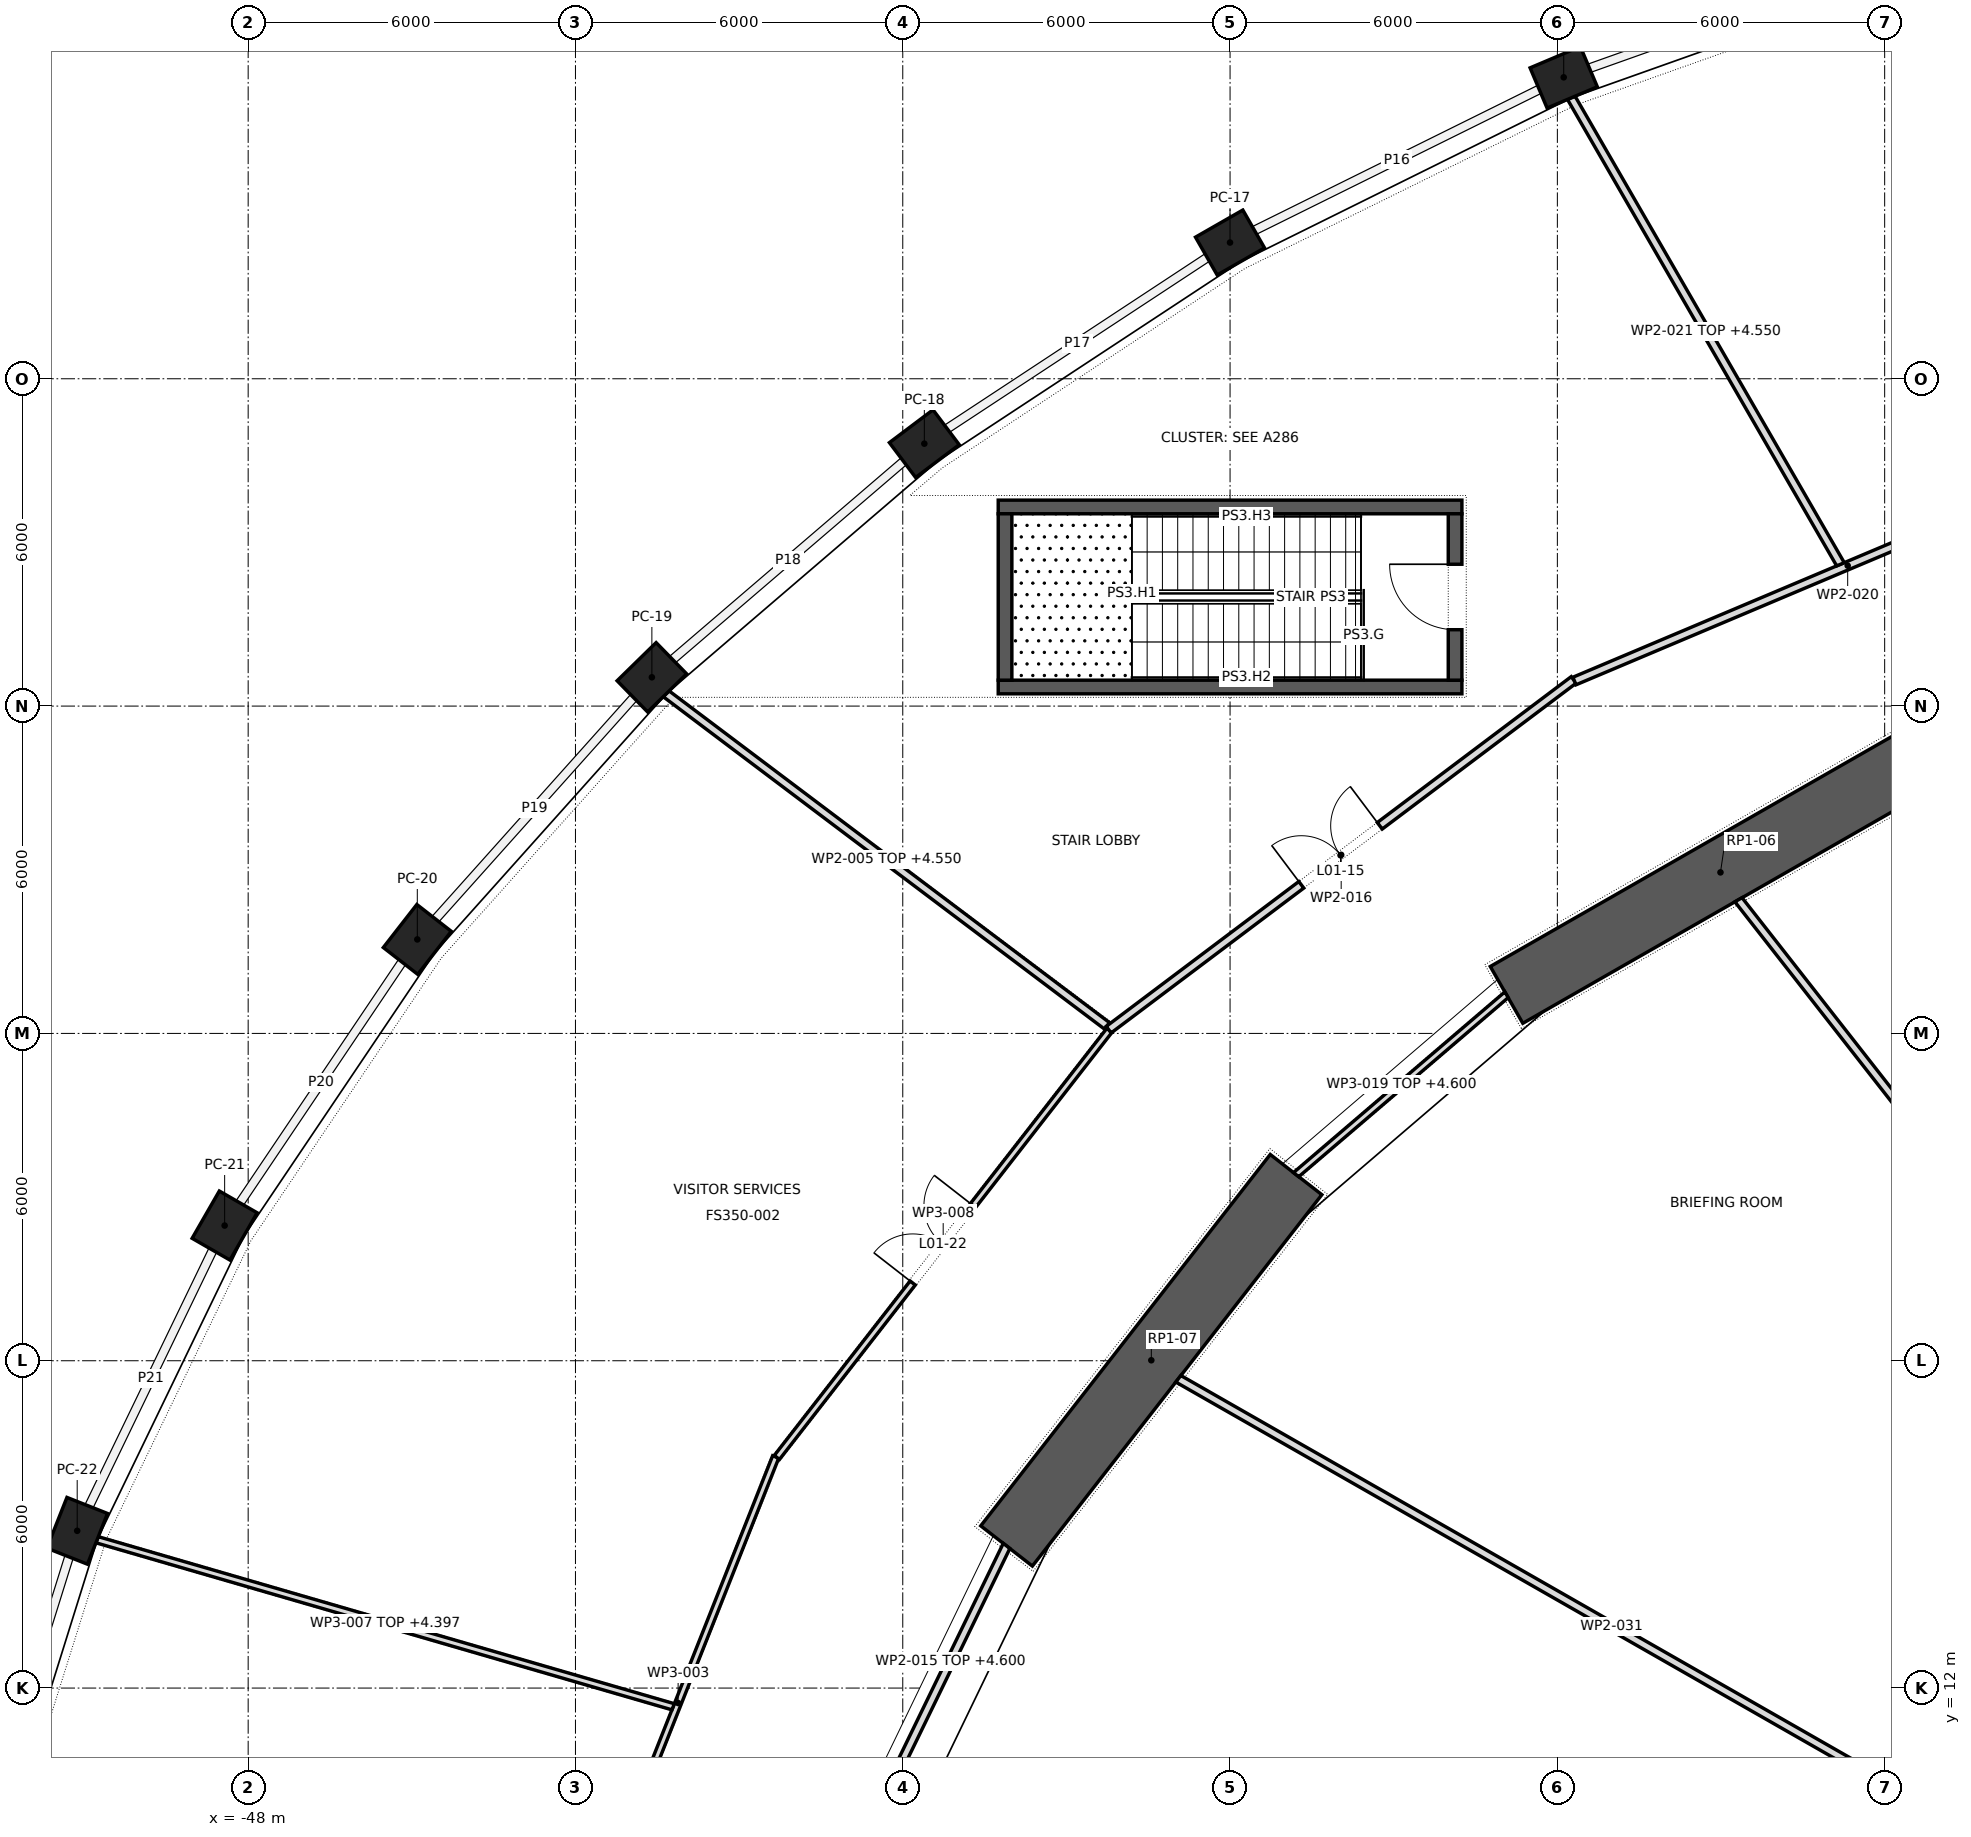
"""IFC4 building model, lengths in metres.
Left out: names, types, materials, properties, quantities, classifications, styles, units other than length and angle.
Written with IfcOpenShell. Run it as: python <this file> out.ifc"""

import sys

from ifc_helpers import new_model, si_unit, direction, frame, frame_2d, origin, origin_2d, place, context, subcontext, project, spatial, polyline, rectangle, outline, extrude, element, fill, save


model = new_model("IFC4")
c1 = context("Model", 3, precision=1e-05, world=origin(), true_north=direction((0.0, 1.0)))
c2 = subcontext(c1, "Body", "Model", "MODEL_VIEW")
j1 = project(units=[si_unit("LENGTHUNIT", "METRE"), si_unit("PLANEANGLEUNIT", "RADIAN")], contexts=[c1])
p1 = place(None, origin())
s1 = spatial("IfcSite", under=j1, at=p1, CompositionType="ELEMENT")
p2 = place(p1, origin())
s2 = spatial("IfcBuilding", under=s1, at=p2, CompositionType="ELEMENT")
p3 = place(p2, frame((0.0, 0.0, 7.0)))
s3 = spatial("IfcBuildingStorey", under=s2, at=p3, CompositionType="ELEMENT", Elevation=7.0)
for number, where, z_axis, x_axis in (
    (1, (-23.884, 41.525, 0.0), (0.0, 0.0, 1.0), (-0.921, -0.389, 0.0)),
    (2, (-30.001, 38.497, 0.0), (0.0, 0.0, 1.0), (-0.868, -0.497, 0.0)),
    (3, (-35.605, 34.81, 0.0), (0.0, 0.0, 1.0), (-0.799, -0.601, 0.0)),
    (4, (-40.599, 30.528, 0.0), (0.0, 0.0, 1.0), (-0.715, -0.699, 0.0)),
    (5, (-44.899, 25.723, 0.0), (0.0, 0.0, 1.0), (-0.615, -0.789, 0.0)),
    (6, (-48.431, 20.478, 0.0), (0.0, 0.0, 1.0), (-0.499, -0.867, 0.0)),
    (7, (-51.134, 14.883, 0.0), (0.0, 0.0, 1.0), (-0.368, -0.93, 0.0)),
):
    element("IfcColumn", number, at=place(p3, frame(where, z_axis=z_axis, x_axis=x_axis)), inside=s3, PredefinedType="COLUMN", context=c2, shape_type="SweptSolid", body=[
        extrude(rectangle(XDim=1.0, YDim=0.8, at=origin_2d()), origin(), (0.0, 0.0, 1.0), 5.5),
    ])
p4 = place(p3, frame((-17.089, 29.198, 0.0), z_axis=(0.0, 0.0, 1.0), x_axis=(-0.867760656864, -0.496982336103, 0.0)))
e8 = element("IfcWall", 8, at=p4, inside=s3, PredefinedType="SHEAR", context=c2, shape_type="SweptSolid", body=[
    extrude(rectangle(XDim=9.038, YDim=1.2, at=frame_2d((4.519, 0.0))), origin(), (0.0, 0.0, 1.0), 5.5),
])
p5 = place(p3, frame((-28.79, 21.412, 0.0), z_axis=(0.0, 0.0, 1.0), x_axis=(-0.614825322247, -0.788663314174, 0.0)))
e9 = element("IfcWall", 9, at=p5, inside=s3, PredefinedType="SHEAR", context=c2, shape_type="SweptSolid", body=[
    extrude(rectangle(XDim=8.632, YDim=1.2, at=frame_2d((4.316, 0.0))), origin(), (0.0, 0.0, 1.0), 5.5),
])
for number, where, z_axis, x_axis in (
    (10, (-34.25, 33.65, 0.0), (0.0, 0.0, 1.0), (1.0, 0.0, 0.0)),
    (11, (-34.25, 30.35, 0.0), (0.0, 0.0, 1.0), (1.0, 0.0, 0.0)),
):
    element("IfcWall", number, at=place(p3, frame(where, z_axis=z_axis, x_axis=x_axis)), inside=s3, PredefinedType="SHEAR", context=c2, shape_type="SweptSolid", body=[
        extrude(rectangle(XDim=8.5, YDim=0.25, at=frame_2d((4.25, 0.0))), origin(), (0.0, 0.0, 1.0), 5.15),
    ])
p6 = place(p3, frame((-34.125, 30.475, 0.0), z_axis=(0.0, 0.0, 1.0), x_axis=(0.0, 1.0, 0.0)))
e12 = element("IfcWall", 12, at=p6, inside=s3, PredefinedType="SHEAR", context=c2, shape_type="SweptSolid", body=[
    extrude(rectangle(XDim=3.05, YDim=0.25, at=frame_2d((1.525, 0.0))), origin(), (0.0, 0.0, 1.0), 5.15),
])
p7 = place(p3, frame((-25.875, 30.475, 0.0), z_axis=(0.0, 0.0, 1.0), x_axis=(0.0, 1.0, 0.0)))
e13 = element("IfcWall", 13, at=p7, inside=s3, PredefinedType="SHEAR", context=c2, shape_type="SweptSolid", body=[
    extrude(rectangle(XDim=3.05, YDim=0.25, at=frame_2d((1.525, 0.0))), origin(), (0.0, 0.0, 1.0), 5.15),
])
p8 = place(p7, frame((0.925, 0.0, 0.0)))
e14 = element("IfcOpeningElement", 14, at=p8, cuts=e13, PredefinedType="OPENING", context=c2, shape_type="SweptSolid", body=[
    extrude(rectangle(XDim=1.2, YDim=2.1, at=frame_2d((0.6, 1.05))), frame((0.0, 0.137, 0.0), z_axis=(0.0, -1.0, 0.0), x_axis=(1.0, 0.0, 0.0)), (0.0, 0.0, 1.0), 0.274),
])
p9 = place(p3, frame((-41.906, 7.214, 0.0), z_axis=(0.0, 0.0, 1.0), x_axis=(0.368535407067, 0.929613712107, 0.0)))
e15 = element("IfcWall", 15, at=p9, inside=s3, PredefinedType="PARTITIONING", context=c2, shape_type="SweptSolid", body=[
    extrude(rectangle(XDim=9.706, YDim=0.12, at=frame_2d((4.853, 0.0))), origin(), (0.0, 0.0, 1.0), 5.15),
])
p10 = place(p3, frame((-40.338, 30.225, 0.0), z_axis=(0.0, 0.0, 1.0), x_axis=(0.79878223103, -0.601620268435, 0.0)))
e16 = element("IfcWall", 16, at=p10, inside=s3, PredefinedType="PARTITIONING", context=c2, shape_type="SweptSolid", body=[
    extrude(outline(polyline([(-0.011, -0.075), (10.118, -0.075), (10.118, 0.075), (0.011, 0.075), (-0.011, -0.075)])), origin(), (0.0, 0.0, 1.0), 4.55),
])
p11 = place(p3, frame((-40.209, 11.657, 0.0), z_axis=(0.0, 0.0, 1.0), x_axis=(-0.960434781241, 0.278504992743, 0.0)))
e17 = element("IfcWall", 17, at=p11, inside=s3, PredefinedType="PARTITIONING", context=c2, shape_type="SweptSolid", body=[
    extrude(outline(polyline([(-0.006, -0.06), (10.99, -0.06), (11.001, 0.06), (0.006, 0.06), (-0.006, -0.06)])), origin(), (0.0, 0.0, 1.0), 4.397),
])
p12 = place(p3, frame((-38.308, 16.228, 0.0), z_axis=(0.0, 0.0, 1.0), x_axis=(0.614374815397, 0.789014313055, 0.0)))
e18 = element("IfcWall", 18, at=p12, inside=s3, PredefinedType="PARTITIONING", context=c2, shape_type="SweptSolid", body=[
    extrude(rectangle(XDim=9.924, YDim=0.12, at=frame_2d((4.962, 0.0))), origin(), (0.0, 0.0, 1.0), 5.15),
])
p13 = place(p12, frame((4.052, 0.0, 0.0)))
e19 = element("IfcOpeningElement", 19, at=p13, cuts=e18, PredefinedType="OPENING", context=c2, shape_type="SweptSolid", body=[
    extrude(rectangle(XDim=1.8, YDim=2.1, at=frame_2d((0.9, 1.05))), frame((0.0, 0.072, 0.0), z_axis=(0.0, -1.0, 0.0), x_axis=(1.0, 0.0, 0.0)), (0.0, 0.0, 1.0), 0.144),
])
p14 = place(p3, frame((-34.097, 14.606, 0.0), z_axis=(0.0, 0.0, 1.0), x_axis=(-0.436936398764, -0.899492403212, 0.0)))
e20 = element("IfcWall", 20, at=p14, inside=s3, PredefinedType="PARTITIONING", context=c2, shape_type="SweptSolid", body=[
    extrude(outline(polyline([(-0.016, -0.075), (4.715, -0.075), (4.681, 0.075), (0.016, 0.075), (-0.016, -0.075)])), origin(), (0.0, 0.0, 1.0), 4.6),
])
p15 = place(p3, frame((-32.225, 24.069, 0.0), z_axis=(0.0, 0.0, 1.0), x_axis=(0.799199975682, 0.601065220147, 0.0)))
e21 = element("IfcWall", 21, at=p15, inside=s3, PredefinedType="PARTITIONING", context=c2, shape_type="SweptSolid", body=[
    extrude(rectangle(XDim=10.666, YDim=0.15, at=frame_2d((5.333, 0.0))), origin(), (0.0, 0.0, 1.0), 5.15),
])
p16 = place(p15, frame((4.418, 0.0, 0.0)))
e22 = element("IfcOpeningElement", 22, at=p16, cuts=e21, PredefinedType="OPENING", context=c2, shape_type="SweptSolid", body=[
    extrude(rectangle(XDim=1.8, YDim=2.1, at=frame_2d((0.9, 1.05))), frame((0.0, 0.087, 0.0), z_axis=(0.0, -1.0, 0.0), x_axis=(1.0, 0.0, 0.0)), (0.0, 0.0, 1.0), 0.174),
])
p17 = place(p3, frame((-24.932, 24.708, 0.0), z_axis=(0.0, 0.0, 1.0), x_axis=(-0.760084552743, -0.649824185978, 0.0)))
e23 = element("IfcWall", 23, at=p17, inside=s3, PredefinedType="PARTITIONING", context=c2, shape_type="SweptSolid", body=[
    extrude(outline(polyline([(-0.011, -0.06), (5.087, -0.06), (5.063, 0.06), (0.011, 0.06), (-0.011, -0.06)])), origin(), (0.0, 0.0, 1.0), 4.6),
])
p18 = place(p3, frame((-23.687, 30.459, 0.0), z_axis=(0.0, 0.0, 1.0), x_axis=(0.921275306177, 0.388911056964, 0.0)))
e24 = element("IfcWall", 24, at=p18, inside=s3, PredefinedType="PARTITIONING", context=c2, shape_type="SweptSolid", body=[
    extrude(rectangle(XDim=10.873, YDim=0.15, at=frame_2d((5.437, 0.0))), origin(), (0.0, 0.0, 1.0), 5.15),
])
p19 = place(p3, frame((-23.745, 41.15, 0.0), z_axis=(0.0, 0.0, 1.0), x_axis=(0.499854452602, -0.866109419308, 0.0)))
e25 = element("IfcWall", 25, at=p19, inside=s3, PredefinedType="PARTITIONING", context=c2, shape_type="SweptSolid", body=[
    extrude(outline(polyline([(-0.009, -0.075), (9.864, -0.075), (9.883, 0.075), (0.009, 0.075), (-0.009, -0.075)])), origin(), (0.0, 0.0, 1.0), 4.55),
])
p20 = place(p3, frame((-20.68, 26.45, 0.0), z_axis=(0.0, 0.0, 1.0), x_axis=(0.616462106178, -0.787384576714, 0.0)))
e26 = element("IfcWall", 26, at=p20, inside=s3, PredefinedType="PARTITIONING", context=c2, shape_type="SweptSolid", body=[
    extrude(outline(polyline([(-0.011, -0.075), (14.119, -0.075), (14.119, 0.075), (0.011, 0.075), (-0.011, -0.075)])), origin(), (0.0, 0.0, 1.0), 5.15),
])
p21 = place(p3, frame((-15.06, 8.594, 0.0), z_axis=(0.0, 0.0, 1.0), x_axis=(-0.868344936016, 0.495960756608, 0.0)))
e27 = element("IfcWall", 27, at=p21, inside=s3, PredefinedType="PARTITIONING", context=c2, shape_type="SweptSolid", body=[
    extrude(outline(polyline([(0.0, -0.075), (18.287, -0.075), (18.309, 0.075), (0.0, 0.075), (0.0, -0.075)])), origin(), (0.0, 0.0, 1.0), 5.15),
])
p22 = place(p8, origin())
e28 = element("IfcDoor", 28, at=p22, inside=s3, OperationType="SINGLE_SWING_LEFT", PredefinedType="DOOR", context=c2, shape_type="SweptSolid", body=[
    extrude(rectangle(XDim=1.2, YDim=2.1, at=frame_2d((0.6, 1.05))), frame((0.0, 0.025, 0.0), z_axis=(0.0, -1.0, 0.0), x_axis=(1.0, 0.0, 0.0)), (0.0, 0.0, 1.0), 0.05),
])
fill(e14, e28)
p23 = place(p16, origin())
e29 = element("IfcDoor", 29, at=p23, inside=s3, OperationType="DOUBLE_DOOR_SINGLE_SWING", PredefinedType="DOOR", context=c2, shape_type="SweptSolid", body=[
    extrude(rectangle(XDim=1.8, YDim=2.1, at=frame_2d((0.9, 1.05))), frame((0.0, 0.025, 0.0), z_axis=(0.0, -1.0, 0.0), x_axis=(1.0, 0.0, 0.0)), (0.0, 0.0, 1.0), 0.05),
])
fill(e22, e29)
p24 = place(p13, origin())
e30 = element("IfcDoor", 30, at=p24, inside=s3, OperationType="DOUBLE_DOOR_SINGLE_SWING", PredefinedType="DOOR", context=c2, shape_type="SweptSolid", body=[
    extrude(rectangle(XDim=1.8, YDim=2.1, at=frame_2d((0.9, 1.05))), frame((0.0, 0.025, 0.0), z_axis=(0.0, -1.0, 0.0), x_axis=(1.0, 0.0, 0.0)), (0.0, 0.0, 1.0), 0.05),
])
fill(e19, e30)
save(model, sys.argv[1])
